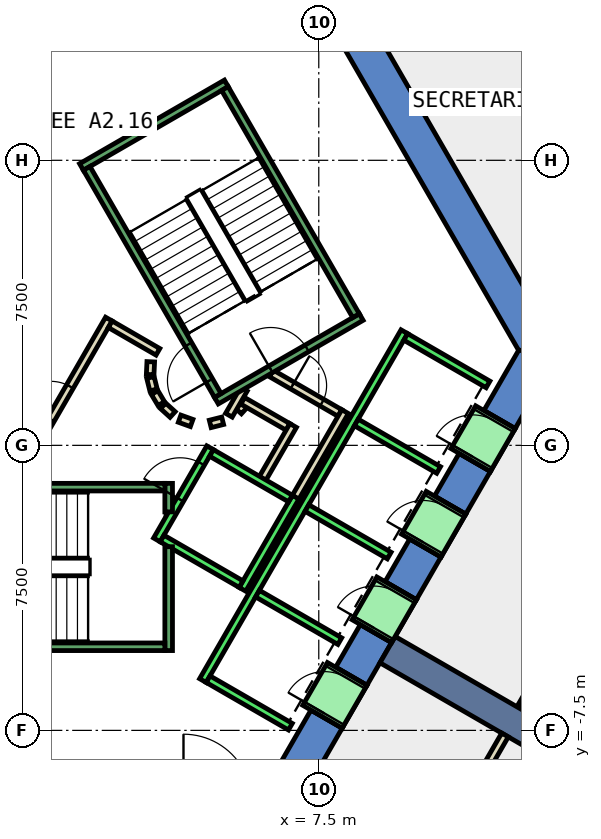
"""IFC4 building model, lengths in metres.
Left out: names, types, materials, properties, quantities, classifications, styles, units other than length and angle.
Written with IfcOpenShell. Run it as: python <this file> out.ifc"""

import sys

from ifc_helpers import new_model, si_unit, direction, frame, frame_2d, origin, place, context, subcontext, project, spatial, polyline, rectangle, outline, extrude, element, fill, save


model = new_model("IFC4")
c1 = context("Model", 3, precision=1e-05, world=origin(), true_north=direction((0.0, 1.0)))
c2 = subcontext(c1, "Body", "Model", "MODEL_VIEW")
j1 = project(units=[si_unit("LENGTHUNIT", "METRE"), si_unit("PLANEANGLEUNIT", "RADIAN")], contexts=[c1])
p1 = place(None, origin())
s1 = spatial("IfcSite", under=j1, at=p1, CompositionType="ELEMENT")
p2 = place(p1, origin())
s2 = spatial("IfcBuilding", under=s1, at=p2, CompositionType="ELEMENT")
p3 = place(p2, frame((0.0, 0.0, 72.8)))
s3 = spatial("IfcBuildingStorey", under=s2, at=p3, CompositionType="ELEMENT", Elevation=72.8)
p4 = place(p3, frame((0.0, 0.0, -0.4)))
e1 = element("IfcWall", 1, at=p4, inside=s3, PredefinedType="SHEAR", context=c2, shape_type="SweptSolid", body=[
    extrude(outline(polyline([(8.517, 11.748), (7.694, 11.273), (12.759, 2.5), (13.856, 2.5), (8.517, 11.748)])), origin(), (0.0, 0.0, 1.0), 4.2),
])
p5 = place(p3, frame((0.0, 0.0, -0.4)))
e2 = element("IfcWall", 2, at=p5, inside=s3, PredefinedType="SHEAR", context=c2, shape_type="SweptSolid", body=[
    extrude(outline(polyline([(8.117, -7.44), (7.295, -6.965), (6.38, -8.55), (6.928, -9.5), (8.117, -7.44)])), origin(), (0.0, 0.0, 1.0), 4.2),
])
p6 = place(p3, frame((0.0, 0.0, -0.4)))
e3 = element("IfcWall", 3, at=p6, inside=s3, PredefinedType="SHEAR", context=c2, shape_type="SweptSolid", body=[
    extrude(outline(polyline([(9.417, -5.189), (8.594, -4.714), (7.945, -5.839), (8.767, -6.314), (9.417, -5.189)])), origin(), (0.0, 0.0, 1.0), 4.2),
])
p7 = place(p3, frame((0.0, 0.0, -0.4)))
e4 = element("IfcWall", 4, at=p7, inside=s3, PredefinedType="SHEAR", context=c2, shape_type="SweptSolid", body=[
    extrude(outline(polyline([(10.717, -2.937), (9.894, -2.462), (9.244, -3.588), (10.067, -4.063), (10.717, -2.937)])), origin(), (0.0, 0.0, 1.0), 4.2),
])
p8 = place(p3, frame((0.0, 0.0, -0.4)))
e5 = element("IfcWall", 5, at=p8, inside=s3, PredefinedType="SHEAR", context=c2, shape_type="SweptSolid", body=[
    extrude(outline(polyline([(12.017, -0.686), (11.194, -0.211), (10.544, -1.336), (11.367, -1.811), (12.017, -0.686)])), origin(), (0.0, 0.0, 1.0), 4.2),
])
p9 = place(p3, frame((0.0, 0.0, -0.4)))
e6 = element("IfcWall", 6, at=p9, inside=s3, PredefinedType="SHEAR", context=c2, shape_type="SweptSolid", body=[
    extrude(outline(polyline([(11.844, 0.915), (12.667, 0.44), (13.856, 2.5), (12.759, 2.5), (11.844, 0.915)])), origin(), (0.0, 0.0, 1.0), 4.2),
])
p10 = place(p3, frame((0.0, 0.0, 3.6)))
e7 = element("IfcWall", 7, at=p10, inside=s3, PredefinedType="SHEAR", context=c2, shape_type="SweptSolid", body=[
    extrude(outline(polyline([(8.767, -6.314), (7.945, -5.839), (7.295, -6.965), (8.117, -7.44), (8.767, -6.314)])), origin(), (0.0, 0.0, 1.0), 0.2),
])
p11 = place(p3, frame((0.0, 0.0, 3.6)))
e8 = element("IfcWall", 8, at=p11, inside=s3, PredefinedType="SHEAR", context=c2, shape_type="SweptSolid", body=[
    extrude(outline(polyline([(10.067, -4.063), (9.244, -3.588), (8.594, -4.714), (9.417, -5.189), (10.067, -4.063)])), origin(), (0.0, 0.0, 1.0), 0.2),
])
p12 = place(p3, frame((0.0, 0.0, 3.6)))
e9 = element("IfcWall", 9, at=p12, inside=s3, PredefinedType="SHEAR", context=c2, shape_type="SweptSolid", body=[
    extrude(outline(polyline([(11.367, -1.811), (10.544, -1.336), (9.894, -2.462), (10.717, -2.937), (11.367, -1.811)])), origin(), (0.0, 0.0, 1.0), 0.2),
])
p13 = place(p3, frame((0.0, 0.0, 3.6)))
e10 = element("IfcWall", 10, at=p13, inside=s3, PredefinedType="SHEAR", context=c2, shape_type="SweptSolid", body=[
    extrude(outline(polyline([(12.667, 0.44), (11.844, 0.915), (11.194, -0.211), (12.017, -0.686), (12.667, 0.44)])), origin(), (0.0, 0.0, 1.0), 0.2),
])
p14 = place(p3, frame((9.31, -5.375, -0.4), z_axis=(0.0, 0.0, 1.0), x_axis=(0.866017533419, -0.500013631625, 0.0)))
e11 = element("IfcWall", 11, at=p14, inside=s3, PredefinedType="SHEAR", context=c2, shape_type="SweptSolid", body=[
    extrude(rectangle(XDim=9.0, YDim=0.8, at=frame_2d((4.5, 0.0))), origin(), (0.0, 0.0, 1.0), 4.2),
])
p15 = place(p3, frame((5.39, 0.898, 0.0), z_axis=(0.0, 0.0, 1.0), x_axis=(0.673828488714, 0.738887791073, 0.0)))
e12 = element("IfcWall", 12, at=p15, inside=s3, PredefinedType="PARTITIONING", context=c2, shape_type="SweptSolid", body=[
    extrude(rectangle(XDim=0.263, YDim=0.2, at=frame_2d((0.131, 0.0))), origin(), (0.0, 0.0, 1.0), 3.8),
])
p16 = place(p3, frame((5.499, 1.172, 0.0), z_axis=(0.0, 0.0, 1.0), x_axis=(0.866333505267, -0.499465972466, 0.0)))
e13 = element("IfcWall", 13, at=p16, inside=s3, PredefinedType="PARTITIONING", context=c2, shape_type="SweptSolid", body=[
    extrude(rectangle(XDim=1.374, YDim=0.2, at=frame_2d((0.687, 0.0))), origin(), (0.0, 0.0, 1.0), 3.8),
])
p17 = place(p3, frame((6.826, 0.522, 0.0), z_axis=(0.0, 0.0, 1.0), x_axis=(-0.500016722714, -0.866015748706, 0.0)))
e14 = element("IfcWall", 14, at=p17, inside=s3, PredefinedType="PARTITIONING", context=c2, shape_type="SweptSolid", body=[
    extrude(rectangle(XDim=1.7, YDim=0.2, at=frame_2d((0.85, 0.0))), origin(), (0.0, 0.0, 1.0), 3.8),
])
p18 = place(p3, frame((6.25, 1.894, 0.0), z_axis=(0.0, 0.0, 1.0), x_axis=(0.866043184279, -0.499969202016, 0.0)))
e15 = element("IfcWall", 15, at=p18, inside=s3, PredefinedType="PARTITIONING", context=c2, shape_type="SweptSolid", body=[
    extrude(rectangle(XDim=2.084, YDim=0.2, at=frame_2d((1.042, 0.0))), origin(), (0.0, 0.0, 1.0), 3.8),
])
p19 = place(p18, frame((0.642, 0.0, 0.0)))
e16 = element("IfcOpeningElement", 16, at=p19, cuts=e15, PredefinedType="OPENING", context=c2, shape_type="SweptSolid", body=[
    extrude(rectangle(XDim=0.9, YDim=2.1, at=frame_2d((0.45, 1.05))), frame((0.0, 0.11, 0.0), z_axis=(0.0, -1.0, 0.0), x_axis=(1.0, 0.0, 0.0)), (0.0, 0.0, 1.0), 0.22),
])
p20 = place(p3, frame((8.192, 0.888, 0.0), z_axis=(0.0, 0.0, 1.0), x_axis=(-0.499940625693, -0.866059680843, 0.0)))
e17 = element("IfcWall", 17, at=p20, inside=s3, PredefinedType="PARTITIONING", context=c2, shape_type="SweptSolid", body=[
    extrude(rectangle(XDim=2.68, YDim=0.2, at=frame_2d((1.34, 0.0))), origin(), (0.0, 0.0, 1.0), 3.8),
])
p21 = place(p3, frame((5.135, 0.793, 0.0), z_axis=(0.0, 0.0, 1.0), x_axis=(0.499526442893, 0.866298639529, 0.0)))
e18 = element("IfcWall", 18, at=p21, inside=s3, PredefinedType="PARTITIONING", context=c2, shape_type="SweptSolid", body=[
    extrude(rectangle(XDim=0.791, YDim=0.2, at=frame_2d((0.396, 0.0))), origin(), (0.0, 0.0, 1.0), 3.8),
])
p22 = place(p3, frame((-0.52, -1.0, 0.0), z_axis=(0.0, 0.0, 1.0), x_axis=(0.50011622646, 0.865958290007, 0.0)))
e19 = element("IfcWall", 19, at=p22, inside=s3, PredefinedType="PARTITIONING", context=c2, shape_type="SweptSolid", body=[
    extrude(rectangle(XDim=4.991, YDim=0.2, at=frame_2d((2.496, 0.0))), origin(), (0.0, 0.0, 1.0), 3.8),
])
p23 = place(p22, frame((1.945, 0.0, 0.0)))
e20 = element("IfcOpeningElement", 20, at=p23, cuts=e19, PredefinedType="OPENING", context=c2, shape_type="SweptSolid", body=[
    extrude(rectangle(XDim=1.0, YDim=2.1, at=frame_2d((0.5, 1.05))), frame((0.0, 0.11, 0.0), z_axis=(0.0, -1.0, 0.0), x_axis=(1.0, 0.0, 0.0)), (0.0, 0.0, 1.0), 0.22),
])
p24 = place(p3, frame((2.012, 3.186, 0.0), z_axis=(0.0, 0.0, 1.0), x_axis=(0.865891012941, -0.500232699559, 0.0)))
e21 = element("IfcWall", 21, at=p24, inside=s3, PredefinedType="PARTITIONING", context=c2, shape_type="SweptSolid", body=[
    extrude(rectangle(XDim=1.449, YDim=0.2, at=frame_2d((0.725, 0.0))), origin(), (0.0, 0.0, 1.0), 3.8),
])
p25 = place(p3, frame((3.079, 2.199, 0.0), z_axis=(0.0, 0.0, 1.0), x_axis=(-0.047771483479, -0.998858290933, 0.0)))
e22 = element("IfcWall", 22, at=p25, inside=s3, PredefinedType="PARTITIONING", context=c2, shape_type="SweptSolid", body=[
    extrude(rectangle(XDim=0.337, YDim=0.2, at=frame_2d((0.169, 0.0))), origin(), (0.0, 0.0, 1.0), 3.8),
])
p26 = place(p3, frame((3.07, 1.786, 0.0), z_axis=(0.0, 0.0, 1.0), x_axis=(0.242705583207, -0.970099994784, 0.0)))
e23 = element("IfcWall", 23, at=p26, inside=s3, PredefinedType="PARTITIONING", context=c2, shape_type="SweptSolid", body=[
    extrude(rectangle(XDim=0.338, YDim=0.2, at=frame_2d((0.169, 0.0))), origin(), (0.0, 0.0, 1.0), 3.8),
])
for number, where, z_axis, x_axis in (
    (24, (3.182, 1.388, 0.0), (0.0, 0.0, 1.0), (0.512, -0.859, 0.0)),
    (25, (3.404, 1.039, 0.0), (0.0, 0.0, 1.0), (0.74, -0.672, 0.0)),
):
    element("IfcWall", number, at=place(p3, frame(where, z_axis=z_axis, x_axis=x_axis)), inside=s3, PredefinedType="PARTITIONING", context=c2, shape_type="SweptSolid", body=[
        extrude(rectangle(XDim=0.338, YDim=0.2, at=frame_2d((0.169, 0.0))), origin(), (0.0, 0.0, 1.0), 3.8),
    ])
p27 = place(p3, frame((3.838, 0.702, 0.0), z_axis=(0.0, 0.0, 1.0), x_axis=(0.941035081519, -0.338308993895, 0.0)))
e26 = element("IfcWall", 26, at=p27, inside=s3, PredefinedType="PARTITIONING", context=c2, shape_type="SweptSolid", body=[
    extrude(rectangle(XDim=0.337, YDim=0.2, at=frame_2d((0.168, 0.0))), origin(), (0.0, 0.0, 1.0), 3.8),
])
p28 = place(p3, frame((4.644, 0.564, 0.0), z_axis=(0.0, 0.0, 1.0), x_axis=(0.969929076366, 0.243387729394, 0.0)))
e27 = element("IfcWall", 27, at=p28, inside=s3, PredefinedType="PARTITIONING", context=c2, shape_type="SweptSolid", body=[
    extrude(rectangle(XDim=0.337, YDim=0.2, at=frame_2d((0.168, 0.0))), origin(), (0.0, 0.0, 1.0), 3.8),
])
p29 = place(p3, frame((12.4, -7.621, 0.0), z_axis=(0.0, 0.0, 1.0), x_axis=(-0.49990497871, -0.866080257402, 0.0)))
e28 = element("IfcWall", 28, at=p29, inside=s3, PredefinedType="PARTITIONING", context=c2, shape_type="SweptSolid", body=[
    extrude(rectangle(XDim=9.302, YDim=0.2, at=frame_2d((4.651, 0.0))), origin(), (0.0, 0.0, 1.0), 3.8),
])
p30 = place(p3, frame((19.374, 4.458, 0.0), z_axis=(0.0, 0.0, 1.0), x_axis=(-0.499973880856, -0.866040483154, 0.0)))
e29 = element("IfcWall", 29, at=p30, inside=s3, PredefinedType="PARTITIONING", context=c2, shape_type="SweptSolid", body=[
    extrude(rectangle(XDim=13.113, YDim=0.2, at=frame_2d((6.556, 0.0))), origin(), (0.0, 0.0, 1.0), 3.8),
])
p31 = place(p3, frame((3.24, -2.488, 0.0), z_axis=(0.0, 0.0, 1.0), x_axis=(0.49994636267, 0.866056369097, 0.0)))
e30 = element("IfcWall", 30, at=p31, inside=s3, PredefinedType="STANDARD", context=c2, shape_type="SweptSolid", body=[
    extrude(rectangle(XDim=2.8, YDim=0.2, at=frame_2d((1.4, 0.0))), origin(), (0.0, 0.0, 1.0), 3.8),
])
p32 = place(p31, frame((1.225, 0.0, 0.0)))
e31 = element("IfcOpeningElement", 31, at=p32, cuts=e30, PredefinedType="OPENING", context=c2, shape_type="SweptSolid", body=[
    extrude(rectangle(XDim=1.1, YDim=2.1, at=frame_2d((0.55, 1.05))), frame((0.0, 0.11, 0.0), z_axis=(0.0, -1.0, 0.0), x_axis=(1.0, 0.0, 0.0)), (0.0, 0.0, 1.0), 0.22),
])
p33 = place(p3, frame((5.492, -3.788, 0.0), z_axis=(0.0, 0.0, 1.0), x_axis=(0.500011755427, 0.866018616679, 0.0)))
e32 = element("IfcWall", 32, at=p33, inside=s3, PredefinedType="STANDARD", context=c2, shape_type="SweptSolid", body=[
    extrude(rectangle(XDim=2.8, YDim=0.2, at=frame_2d((1.4, 0.0))), origin(), (0.0, 0.0, 1.0), 3.8),
])
p34 = place(p3, frame((3.377, -2.452, 0.0), z_axis=(0.0, 0.0, 1.0), x_axis=(0.865955154139, -0.50012165622, 0.0)))
e33 = element("IfcWall", 33, at=p34, inside=s3, PredefinedType="STANDARD", context=c2, shape_type="SweptSolid", body=[
    extrude(rectangle(XDim=2.4, YDim=0.2, at=frame_2d((1.2, 0.0))), origin(), (0.0, 0.0, 1.0), 3.8),
])
p35 = place(p3, frame((4.677, -0.2, 0.0), z_axis=(0.0, 0.0, 1.0), x_axis=(0.865973769406, -0.500089422704, 0.0)))
e34 = element("IfcWall", 34, at=p35, inside=s3, PredefinedType="STANDARD", context=c2, shape_type="SweptSolid", body=[
    extrude(rectangle(XDim=2.399, YDim=0.2, at=frame_2d((1.2, 0.0))), origin(), (0.0, 0.0, 1.0), 3.8),
])
p36 = place(p3, frame((4.451, -6.19, 0.0), z_axis=(0.0, 0.0, 1.0), x_axis=(0.50000090737, 0.866024879913, 0.0)))
e35 = element("IfcWall", 35, at=p36, inside=s3, PredefinedType="STANDARD", context=c2, shape_type="SweptSolid", body=[
    extrude(rectangle(XDim=10.6, YDim=0.2, at=frame_2d((5.3, 0.0))), origin(), (0.0, 0.0, 1.0), 3.8),
])
for number, where, z_axis, x_axis in (
    (36, (4.588, -6.153, 0.0), (0.0, 0.0, 1.0), (0.866, -0.5, 0.0)),
    (37, (5.888, -3.902, 0.0), (0.0, 0.0, 1.0), (0.866, -0.5, 0.0)),
    (38, (7.188, -1.65, 0.0), (0.0, 0.0, 1.0), (0.866, -0.5, 0.0)),
    (39, (8.488, 0.602, 0.0), (0.0, 0.0, 1.0), (0.866, -0.5, 0.0)),
):
    element("IfcWall", number, at=place(p3, frame(where, z_axis=z_axis, x_axis=x_axis)), inside=s3, PredefinedType="STANDARD", context=c2, shape_type="SweptSolid", body=[
        extrude(rectangle(XDim=2.5, YDim=0.2, at=frame_2d((1.25, 0.0))), origin(), (0.0, 0.0, 1.0), 3.8),
    ])
p37 = place(p3, frame((9.788, 2.853, 0.0), z_axis=(0.0, 0.0, 1.0), x_axis=(0.865998541277, -0.500046524342, 0.0)))
e40 = element("IfcWall", 40, at=p37, inside=s3, PredefinedType="STANDARD", context=c2, shape_type="SweptSolid", body=[
    extrude(rectangle(XDim=2.5, YDim=0.2, at=frame_2d((1.25, 0.0))), origin(), (0.0, 0.0, 1.0), 3.8),
])
p38 = place(p3, frame((7.598, -7.14, 0.0), z_axis=(0.0, 0.0, 1.0), x_axis=(0.500362116554, 0.865816234728, 0.0)))
e41 = element("IfcWall", 41, at=p38, inside=s3, PredefinedType="STANDARD", context=c2, shape_type="SweptSolid", body=[
    extrude(rectangle(XDim=1.299, YDim=1.2, at=frame_2d((0.65, 0.0))), origin(), (0.0, 0.0, 1.0), 2.4),
])
p39 = place(p38, frame((0.1, 0.0, 0.0)))
e42 = element("IfcOpeningElement", 42, at=p39, cuts=e41, PredefinedType="OPENING", context=c2, shape_type="SweptSolid", body=[
    extrude(rectangle(XDim=1.1, YDim=2.3, at=frame_2d((0.55, 1.15))), frame((0.0, 0.61, 0.0), z_axis=(0.0, -1.0, 0.0), x_axis=(1.0, 0.0, 0.0)), (0.0, 0.0, 1.0), 1.22),
])
p40 = place(p3, frame((8.898, -4.889, 0.0), z_axis=(0.0, 0.0, 1.0), x_axis=(0.500036693733, 0.866004217611, 0.0)))
e43 = element("IfcWall", 43, at=p40, inside=s3, PredefinedType="STANDARD", context=c2, shape_type="SweptSolid", body=[
    extrude(rectangle(XDim=1.3, YDim=1.2, at=frame_2d((0.65, 0.0))), origin(), (0.0, 0.0, 1.0), 2.4),
])
p41 = place(p40, frame((0.1, 0.0, 0.0)))
e44 = element("IfcOpeningElement", 44, at=p41, cuts=e43, PredefinedType="OPENING", context=c2, shape_type="SweptSolid", body=[
    extrude(rectangle(XDim=1.1, YDim=2.3, at=frame_2d((0.55, 1.15))), frame((0.0, 0.61, 0.0), z_axis=(0.0, -1.0, 0.0), x_axis=(1.0, 0.0, 0.0)), (0.0, 0.0, 1.0), 1.22),
])
p42 = place(p3, frame((10.198, -2.637, 0.0), z_axis=(0.0, 0.0, 1.0), x_axis=(0.49989585183, 0.866085525409, 0.0)))
e45 = element("IfcWall", 45, at=p42, inside=s3, PredefinedType="STANDARD", context=c2, shape_type="SweptSolid", body=[
    extrude(rectangle(XDim=1.3, YDim=1.2, at=frame_2d((0.65, 0.0))), origin(), (0.0, 0.0, 1.0), 2.4),
])
p43 = place(p42, frame((0.1, 0.0, 0.0)))
e46 = element("IfcOpeningElement", 46, at=p43, cuts=e45, PredefinedType="OPENING", context=c2, shape_type="SweptSolid", body=[
    extrude(rectangle(XDim=1.1, YDim=2.3, at=frame_2d((0.55, 1.15))), frame((0.0, 0.61, 0.0), z_axis=(0.0, -1.0, 0.0), x_axis=(1.0, 0.0, 0.0)), (0.0, 0.0, 1.0), 1.22),
])
p44 = place(p3, frame((11.498, -0.385, 0.0), z_axis=(0.0, 0.0, 1.0), x_axis=(0.500221244143, 0.865897630733, 0.0)))
e47 = element("IfcWall", 47, at=p44, inside=s3, PredefinedType="STANDARD", context=c2, shape_type="SweptSolid", body=[
    extrude(rectangle(XDim=1.299, YDim=1.2, at=frame_2d((0.65, 0.0))), origin(), (0.0, 0.0, 1.0), 2.4),
])
p45 = place(p44, frame((0.1, 0.0, 0.0)))
e48 = element("IfcOpeningElement", 48, at=p45, cuts=e47, PredefinedType="OPENING", context=c2, shape_type="SweptSolid", body=[
    extrude(rectangle(XDim=1.1, YDim=2.3, at=frame_2d((0.55, 1.15))), frame((0.0, 0.61, 0.0), z_axis=(0.0, -1.0, 0.0), x_axis=(1.0, 0.0, 0.0)), (0.0, 0.0, 1.0), 1.22),
])
p46 = place(p3, frame((3.55, -2.667, 0.0), z_axis=(0.0, 0.0, 1.0), x_axis=(0.0, -1.0, 0.0)))
e49 = element("IfcWall", 49, at=p46, inside=s3, PredefinedType="STANDARD", context=c2, shape_type="SweptSolid", body=[
    extrude(rectangle(XDim=2.733, YDim=0.2, at=frame_2d((1.366, 0.0))), origin(), (0.0, 0.0, 1.0), 3.8),
])
p47 = place(p3, frame((3.55, -1.0, 0.0), z_axis=(0.0, 0.0, 1.0), x_axis=(0.0, -1.0, 0.0)))
e50 = element("IfcWall", 50, at=p47, inside=s3, PredefinedType="STANDARD", context=c2, shape_type="SweptSolid", body=[
    extrude(rectangle(XDim=0.751, YDim=0.2, at=frame_2d((0.375, 0.0))), origin(), (0.0, 0.0, 1.0), 3.8),
])
p48 = place(p3, frame((-3.45, -1.1, 0.0), z_axis=(0.0, 0.0, 1.0), x_axis=(1.0, 0.0, 0.0)))
e51 = element("IfcWall", 51, at=p48, inside=s3, PredefinedType="STANDARD", context=c2, shape_type="SweptSolid", body=[
    extrude(rectangle(XDim=6.9, YDim=0.2, at=frame_2d((3.45, 0.0))), origin(), (0.0, 0.0, 1.0), 3.8),
])
p49 = place(p48, frame((0.45, 0.0, 0.0)))
e52 = element("IfcOpeningElement", 52, at=p49, cuts=e51, PredefinedType="OPENING", context=c2, shape_type="SweptSolid", body=[
    extrude(rectangle(XDim=1.1, YDim=2.2, at=frame_2d((0.55, 1.1))), frame((0.0, 0.11, 0.0), z_axis=(0.0, -1.0, 0.0), x_axis=(1.0, 0.0, 0.0)), (0.0, 0.0, 1.0), 0.22),
])
p50 = place(p3, frame((-3.45, -5.3, 0.0), z_axis=(0.0, 0.0, 1.0), x_axis=(1.0, 0.0, 0.0)))
e53 = element("IfcWall", 53, at=p50, inside=s3, PredefinedType="STANDARD", context=c2, shape_type="SweptSolid", body=[
    extrude(rectangle(XDim=6.9, YDim=0.2, at=frame_2d((3.45, 0.0))), origin(), (0.0, 0.0, 1.0), 3.8),
])
p51 = place(p3, frame((4.806, 1.176, 0.0), z_axis=(0.0, 0.0, 1.0), x_axis=(0.866059941101, 0.499940174841, 0.0)))
e54 = element("IfcWall", 54, at=p51, inside=s3, PredefinedType="STANDARD", context=c2, shape_type="SweptSolid", body=[
    extrude(rectangle(XDim=4.4, YDim=0.2, at=frame_2d((2.2, 0.0))), origin(), (0.0, 0.0, 1.0), 3.8),
])
p52 = place(p51, frame((1.65, 0.0, 0.0)))
e55 = element("IfcOpeningElement", 55, at=p52, cuts=e54, PredefinedType="OPENING", context=c2, shape_type="SweptSolid", body=[
    extrude(rectangle(XDim=1.1, YDim=2.2, at=frame_2d((0.55, 1.1))), frame((0.0, 0.11, 0.0), z_axis=(0.0, -1.0, 0.0), x_axis=(1.0, 0.0, 0.0)), (0.0, 0.0, 1.0), 0.22),
])
p53 = place(p3, frame((1.256, 7.324, 0.0), z_axis=(0.0, 0.0, 1.0), x_axis=(0.866046073146, 0.499964197906, 0.0)))
e56 = element("IfcWall", 56, at=p53, inside=s3, PredefinedType="STANDARD", context=c2, shape_type="SweptSolid", body=[
    extrude(rectangle(XDim=4.4, YDim=0.2, at=frame_2d((2.2, 0.0))), origin(), (0.0, 0.0, 1.0), 3.8),
])
p54 = place(p3, frame((4.843, 1.312, 0.0), z_axis=(0.0, 0.0, 1.0), x_axis=(-0.499963383562, 0.866046543262, 0.0)))
e57 = element("IfcWall", 57, at=p54, inside=s3, PredefinedType="STANDARD", context=c2, shape_type="SweptSolid", body=[
    extrude(rectangle(XDim=6.9, YDim=0.2, at=frame_2d((3.45, 0.0))), origin(), (0.0, 0.0, 1.0), 3.8),
])
p55 = place(p54, frame((0.45, 0.0, 0.0)))
e58 = element("IfcOpeningElement", 58, at=p55, cuts=e57, PredefinedType="OPENING", context=c2, shape_type="SweptSolid", body=[
    extrude(rectangle(XDim=1.1, YDim=2.2, at=frame_2d((0.55, 1.1))), frame((0.0, 0.11, 0.0), z_axis=(0.0, -1.0, 0.0), x_axis=(1.0, 0.0, 0.0)), (0.0, 0.0, 1.0), 0.22),
])
p56 = place(p3, frame((8.48, 3.412, 0.0), z_axis=(0.0, 0.0, 1.0), x_axis=(-0.499978703459, 0.866037698999, 0.0)))
e59 = element("IfcWall", 59, at=p56, inside=s3, PredefinedType="STANDARD", context=c2, shape_type="SweptSolid", body=[
    extrude(rectangle(XDim=6.9, YDim=0.2, at=frame_2d((3.45, 0.0))), origin(), (0.0, 0.0, 1.0), 3.8),
])
p57 = place(p23, origin())
e60 = element("IfcDoor", 60, at=p57, inside=s3, OperationType="SINGLE_SWING_LEFT", PredefinedType="DOOR", context=c2, shape_type="SweptSolid", body=[
    extrude(rectangle(XDim=1.0, YDim=2.1, at=frame_2d((0.5, 1.05))), frame((0.0, 0.025, 0.0), z_axis=(0.0, -1.0, 0.0), x_axis=(1.0, 0.0, 0.0)), (0.0, 0.0, 1.0), 0.05),
])
fill(e20, e60)
p58 = place(p19, origin())
e61 = element("IfcDoor", 61, at=p58, inside=s3, OperationType="SINGLE_SWING_LEFT", PredefinedType="DOOR", context=c2, shape_type="SweptSolid", body=[
    extrude(rectangle(XDim=0.9, YDim=2.1, at=frame_2d((0.45, 1.05))), frame((0.0, 0.025, 0.0), z_axis=(0.0, -1.0, 0.0), x_axis=(1.0, 0.0, 0.0)), (0.0, 0.0, 1.0), 0.05),
])
fill(e16, e61)
p59 = place(p39, origin())
e62 = element("IfcDoor", 62, at=p59, inside=s3, OperationType="SLIDING_TO_LEFT", PredefinedType="DOOR", context=c2, shape_type="SweptSolid", body=[
    extrude(rectangle(XDim=1.1, YDim=2.3, at=frame_2d((0.55, 1.15))), frame((0.0, 0.025, 0.0), z_axis=(0.0, -1.0, 0.0), x_axis=(1.0, 0.0, 0.0)), (0.0, 0.0, 1.0), 0.05),
])
fill(e42, e62)
p60 = place(p41, origin())
e63 = element("IfcDoor", 63, at=p60, inside=s3, OperationType="SLIDING_TO_LEFT", PredefinedType="DOOR", context=c2, shape_type="SweptSolid", body=[
    extrude(rectangle(XDim=1.1, YDim=2.3, at=frame_2d((0.55, 1.15))), frame((0.0, 0.025, 0.0), z_axis=(0.0, -1.0, 0.0), x_axis=(1.0, 0.0, 0.0)), (0.0, 0.0, 1.0), 0.05),
])
fill(e44, e63)
p61 = place(p43, origin())
e64 = element("IfcDoor", 64, at=p61, inside=s3, OperationType="SLIDING_TO_LEFT", PredefinedType="DOOR", context=c2, shape_type="SweptSolid", body=[
    extrude(rectangle(XDim=1.1, YDim=2.3, at=frame_2d((0.55, 1.15))), frame((0.0, 0.025, 0.0), z_axis=(0.0, -1.0, 0.0), x_axis=(1.0, 0.0, 0.0)), (0.0, 0.0, 1.0), 0.05),
])
fill(e46, e64)
p62 = place(p45, origin())
e65 = element("IfcDoor", 65, at=p62, inside=s3, OperationType="SLIDING_TO_LEFT", PredefinedType="DOOR", context=c2, shape_type="SweptSolid", body=[
    extrude(rectangle(XDim=1.1, YDim=2.3, at=frame_2d((0.55, 1.15))), frame((0.0, 0.025, 0.0), z_axis=(0.0, -1.0, 0.0), x_axis=(1.0, 0.0, 0.0)), (0.0, 0.0, 1.0), 0.05),
])
fill(e48, e65)
p63 = place(p32, origin())
e66 = element("IfcDoor", 66, at=p63, inside=s3, OperationType="SLIDING_TO_LEFT", PredefinedType="DOOR", context=c2, shape_type="SweptSolid", body=[
    extrude(rectangle(XDim=1.1, YDim=2.1, at=frame_2d((0.55, 1.05))), frame((0.0, 0.025, 0.0), z_axis=(0.0, -1.0, 0.0), x_axis=(1.0, 0.0, 0.0)), (0.0, 0.0, 1.0), 0.05),
])
fill(e31, e66)
p64 = place(p55, origin())
e67 = element("IfcDoor", 67, at=p64, inside=s3, OperationType="SINGLE_SWING_LEFT", PredefinedType="DOOR", context=c2, shape_type="SweptSolid", body=[
    extrude(rectangle(XDim=1.1, YDim=2.2, at=frame_2d((0.55, 1.1))), frame((0.0, 0.025, 0.0), z_axis=(0.0, -1.0, 0.0), x_axis=(1.0, 0.0, 0.0)), (0.0, 0.0, 1.0), 0.05),
])
fill(e58, e67)
p65 = place(p52, origin())
e68 = element("IfcDoor", 68, at=p65, inside=s3, OperationType="SINGLE_SWING_LEFT", PredefinedType="DOOR", context=c2, shape_type="SweptSolid", body=[
    extrude(rectangle(XDim=1.1, YDim=2.2, at=frame_2d((0.55, 1.1))), frame((0.0, 0.025, 0.0), z_axis=(0.0, -1.0, 0.0), x_axis=(1.0, 0.0, 0.0)), (0.0, 0.0, 1.0), 0.05),
])
fill(e55, e68)
save(model, sys.argv[1])
